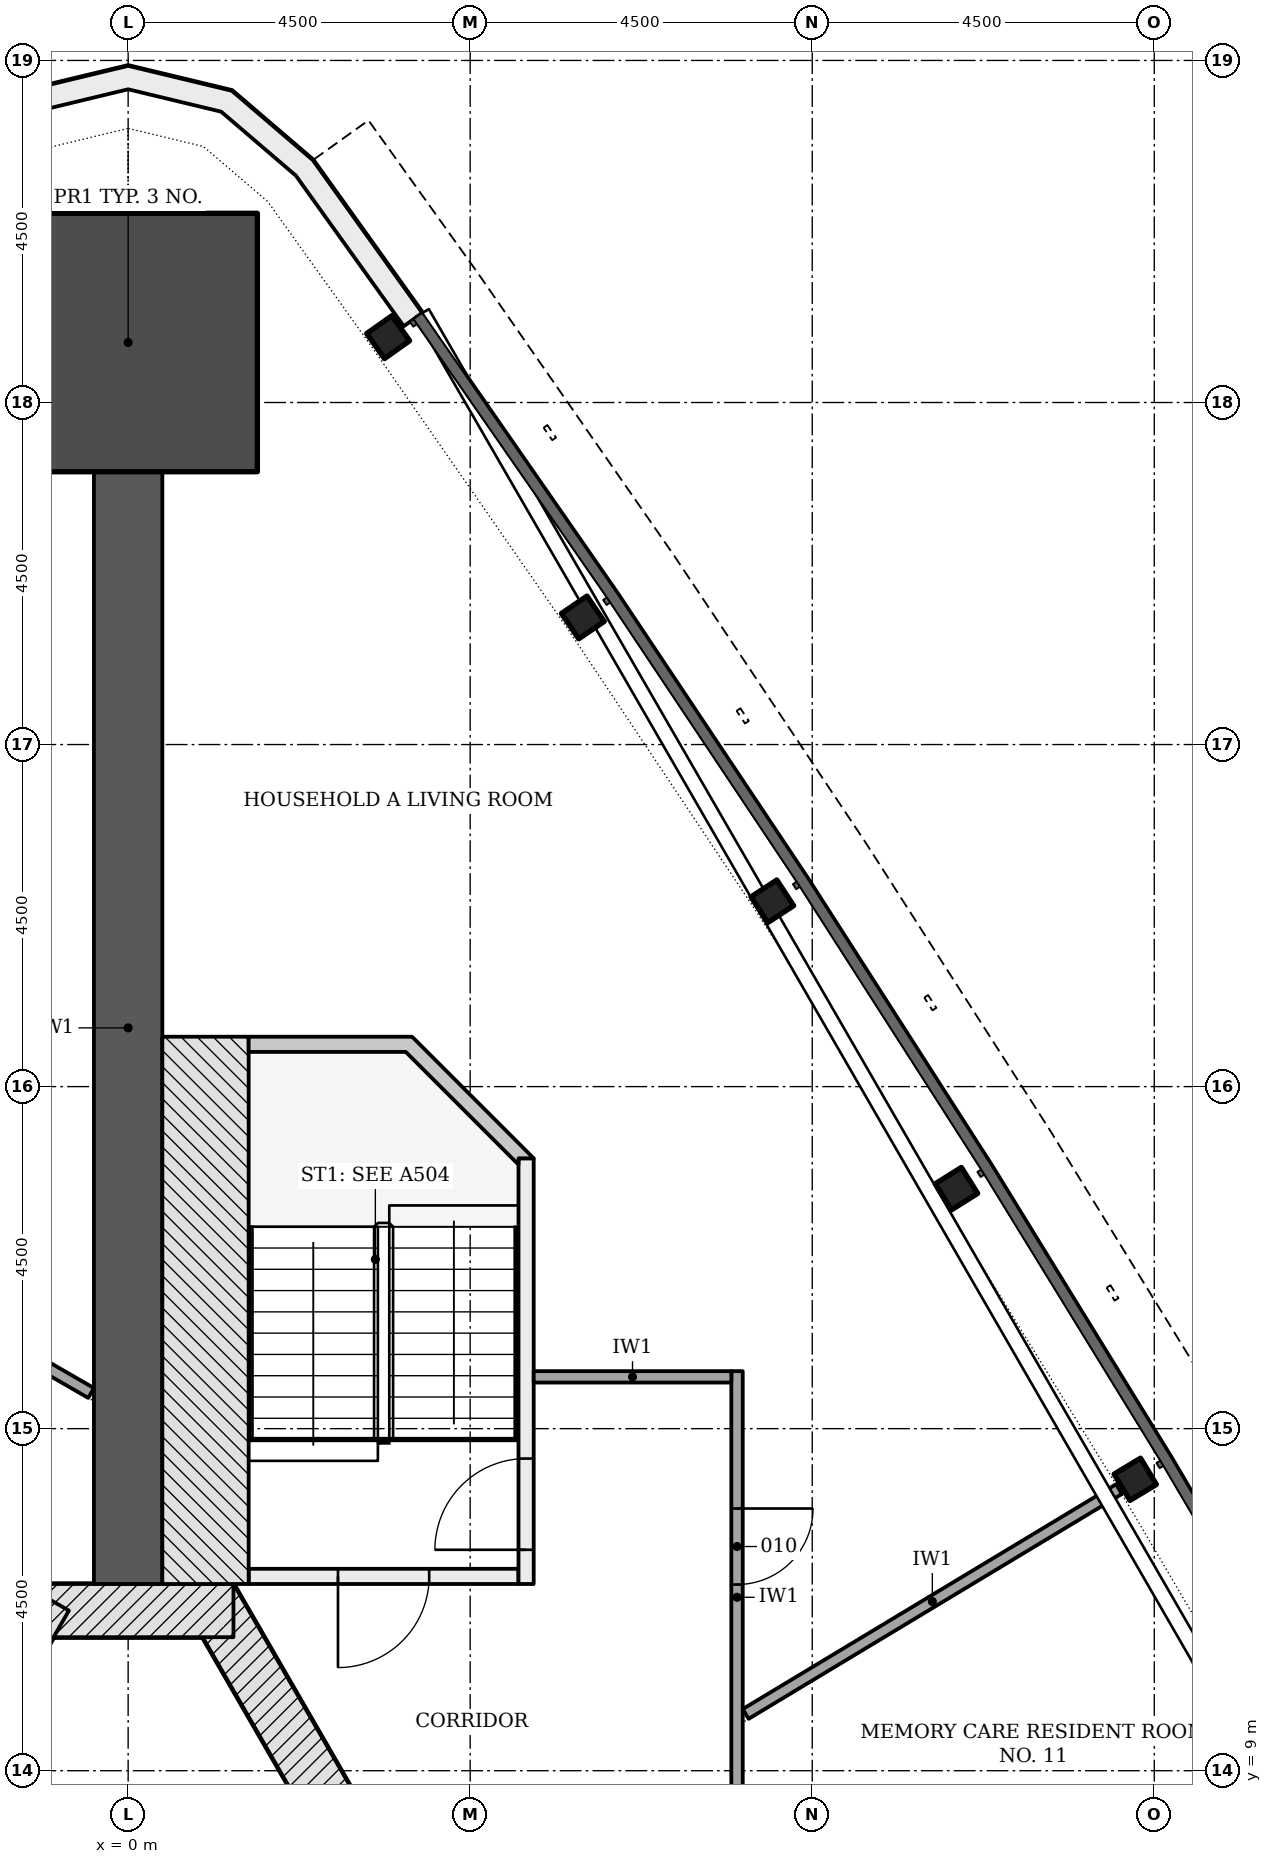
"""IFC4 building model, lengths in metres.
Left out: names, types, materials, properties, quantities, classifications, styles, units other than length and angle.
Written with IfcOpenShell. Run it as: python <this file> out.ifc"""

import sys

from ifc_helpers import new_model, si_unit, direction, frame, frame_2d, origin, origin_2d, place, context, subcontext, project, spatial, polyline, rectangle, i_section, outline, extrude, element, fill, save


model = new_model("IFC4")
c1 = context("Model", 3, precision=1e-05, world=origin(), true_north=direction((0.0, 1.0)))
c2 = subcontext(c1, "Body", "Model", "MODEL_VIEW")
j1 = project(units=[si_unit("LENGTHUNIT", "METRE"), si_unit("PLANEANGLEUNIT", "RADIAN")], contexts=[c1])
p1 = place(None, origin())
s1 = spatial("IfcSite", under=j1, at=p1, CompositionType="ELEMENT")
p2 = place(p1, origin())
s2 = spatial("IfcBuilding", under=s1, at=p2, CompositionType="ELEMENT")
p3 = place(p2, frame((0.0, 0.0, 27.6)))
s3 = spatial("IfcBuildingStorey", under=s2, at=p3, CompositionType="ELEMENT", Elevation=27.6)
p4 = place(p3, frame((10.311, -4.703, -0.2), z_axis=(0.0, 0.0, 1.0), x_axis=(-0.500001446645, 0.866024568562, 0.0)))
e1 = element("IfcWall", 1, at=p4, inside=s3, PredefinedType="SHEAR", context=c2, shape_type="SweptSolid", body=[
    extrude(rectangle(XDim=18.458, YDim=0.7, at=frame_2d((9.229, 0.0))), origin(), (0.0, 0.0, 1.0), 3.6),
])
p5 = place(p4, frame((8.7, 0.0, 0.2)))
e2 = element("IfcOpeningElement", 2, at=p5, cuts=e1, PredefinedType="OPENING", context=c2, shape_type="SweptSolid", body=[
    extrude(rectangle(XDim=1.0, YDim=2.1, at=frame_2d((0.5, 1.05))), frame((0.0, 0.36, 0.0), z_axis=(0.0, -1.0, 0.0), x_axis=(1.0, 0.0, 0.0)), (0.0, 0.0, 1.0), 0.72),
])
p6 = place(p4, frame((3.99, 0.0, 0.2)))
e3 = element("IfcOpeningElement", 3, at=p6, cuts=e1, PredefinedType="OPENING", context=c2, shape_type="SweptSolid", body=[
    extrude(rectangle(XDim=0.9, YDim=2.1, at=frame_2d((0.45, 1.05))), frame((0.0, 0.36, 0.0), z_axis=(0.0, -1.0, 0.0), x_axis=(1.0, 0.0, 0.0)), (0.0, 0.0, 1.0), 0.72),
])
p7 = place(p4, frame((13.539, 0.0, 0.2)))
e4 = element("IfcOpeningElement", 4, at=p7, cuts=e1, PredefinedType="OPENING", context=c2, shape_type="SweptSolid", body=[
    extrude(rectangle(XDim=0.9, YDim=2.1, at=frame_2d((0.45, 1.05))), frame((0.0, 0.36, 0.0), z_axis=(0.0, -1.0, 0.0), x_axis=(1.0, 0.0, 0.0)), (0.0, 0.0, 1.0), 0.72),
])
p8 = place(p3, frame((1.386, 11.106, -0.2), z_axis=(0.0, 0.0, 1.0), x_axis=(-1.0, 0.0, 0.0)))
e5 = element("IfcWall", 5, at=p8, inside=s3, PredefinedType="SHEAR", context=c2, shape_type="SweptSolid", body=[
    extrude(rectangle(XDim=2.771, YDim=0.7, at=frame_2d((1.386, 0.0))), origin(), (0.0, 0.0, 1.0), 3.6),
])
p9 = place(p3, frame((-1.083, 11.281, -0.2), z_axis=(0.0, 0.0, 1.0), x_axis=(-0.500001446645, -0.866024568562, 0.0)))
e6 = element("IfcWall", 6, at=p9, inside=s3, PredefinedType="SHEAR", context=c2, shape_type="SweptSolid", body=[
    extrude(rectangle(XDim=18.458, YDim=0.7, at=frame_2d((9.229, 0.0))), origin(), (0.0, 0.0, 1.0), 3.6),
])
p10 = place(p9, frame((8.979, 0.0, 0.2)))
e7 = element("IfcOpeningElement", 7, at=p10, cuts=e6, PredefinedType="OPENING", context=c2, shape_type="SweptSolid", body=[
    extrude(rectangle(XDim=1.2, YDim=2.1, at=frame_2d((0.6, 1.05))), frame((0.0, 0.36, 0.0), z_axis=(0.0, -1.0, 0.0), x_axis=(1.0, 0.0, 0.0)), (0.0, 0.0, 1.0), 0.72),
])
p11 = place(p9, frame((11.029, 0.0, 0.2)))
e8 = element("IfcOpeningElement", 8, at=p11, cuts=e6, PredefinedType="OPENING", context=c2, shape_type="SweptSolid", body=[
    extrude(rectangle(XDim=1.2, YDim=2.1, at=frame_2d((0.6, 1.05))), frame((0.0, 0.36, 0.0), z_axis=(0.0, -1.0, 0.0), x_axis=(1.0, 0.0, 0.0)), (0.0, 0.0, 1.0), 0.72),
])
p12 = place(p3, frame((0.0, 11.456, -0.2), z_axis=(0.0, 0.0, 1.0), x_axis=(0.0, 1.0, 0.0)))
e9 = element("IfcWall", 9, at=p12, inside=s3, PredefinedType="SHEAR", context=c2, shape_type="SweptSolid", body=[
    extrude(rectangle(XDim=14.633, YDim=0.9, at=frame_2d((7.316, 0.0))), origin(), (0.0, 0.0, 1.0), 3.6),
])
p13 = place(p3, frame((0.0, 27.789, -0.2), z_axis=(0.0, 0.0, 1.0), x_axis=(0.0, 1.0, 0.0)))
e10 = element("IfcColumn", 10, at=p13, inside=s3, PredefinedType="COLUMN", context=c2, shape_type="SweptSolid", body=[
    extrude(rectangle(XDim=3.4, YDim=3.4, at=origin_2d()), origin(), (0.0, 0.0, 1.0), 3.6),
])
for number, where, z_axis, x_axis in (
    (11, (13.25, 12.834, -0.2), (0.0, 0.0, 1.0), (-0.516, 0.857, 0.0)),
    (12, (10.897, 16.658, -0.2), (0.0, 0.0, 1.0), (-0.532, 0.847, 0.0)),
    (13, (8.475, 20.438, -0.2), (0.0, 0.0, 1.0), (-0.547, 0.837, 0.0)),
    (14, (5.982, 24.172, -0.2), (0.0, 0.0, 1.0), (-0.563, 0.827, 0.0)),
    (15, (3.421, 27.86, -0.2), (0.0, 0.0, 1.0), (-0.578, 0.816, 0.0)),
):
    element("IfcColumn", number, at=place(p3, frame(where, z_axis=z_axis, x_axis=x_axis)), inside=s3, PredefinedType="COLUMN", context=c2, shape_type="SweptSolid", body=[
        extrude(i_section(OverallWidth=0.404, OverallDepth=0.406, WebThickness=0.027, FlangeThickness=0.044, FilletRadius=0.015, at=origin_2d()), origin(), (0.0, 0.0, 1.0), 3.6),
    ])
p14 = place(p3, origin())
e16 = element("IfcWall", 16, at=p14, inside=s3, PredefinedType="NOTDEFINED", context=c2, shape_type="SweptSolid", body=[
    extrude(outline(polyline([(3.87, 28.178), (2.43, 30.188), (1.364, 31.101), (0.0, 31.429), (-1.364, 31.101), (-2.43, 30.188), (-3.87, 28.178), (-3.626, 28.003), (-2.208, 29.984), (-1.224, 30.826), (0.0, 31.121), (1.224, 30.826), (2.208, 29.984), (3.626, 28.003), (3.87, 28.178)])), origin(), (0.0, 0.0, 1.0), 3.3),
])
p15 = place(p3, frame((5.135, 11.556, -0.2), z_axis=(0.0, 0.0, 1.0), x_axis=(-1.0, 0.0, 0.0)))
e17 = element("IfcWall", 17, at=p15, inside=s3, PredefinedType="SHEAR", context=c2, shape_type="SweptSolid", body=[
    extrude(rectangle(XDim=3.55, YDim=0.2, at=frame_2d((1.775, 0.0))), origin(), (0.0, 0.0, 1.0), 3.6),
])
p16 = place(p15, frame((1.175, 0.0, 0.2)))
e18 = element("IfcOpeningElement", 18, at=p16, cuts=e17, PredefinedType="OPENING", context=c2, shape_type="SweptSolid", body=[
    extrude(rectangle(XDim=1.2, YDim=2.1, at=frame_2d((0.6, 1.05))), frame((0.0, 0.11, 0.0), z_axis=(0.0, -1.0, 0.0), x_axis=(1.0, 0.0, 0.0)), (0.0, 0.0, 1.0), 0.22),
])
p17 = place(p3, frame((5.236, 11.456, -0.2), z_axis=(0.0, 0.0, 1.0), x_axis=(0.0, 1.0, 0.0)))
e19 = element("IfcWall", 19, at=p17, inside=s3, PredefinedType="SHEAR", context=c2, shape_type="SweptSolid", body=[
    extrude(rectangle(XDim=5.6, YDim=0.2, at=frame_2d((2.8, 0.0))), origin(), (0.0, 0.0, 1.0), 3.6),
])
p18 = place(p17, frame((0.45, 0.0, 0.2)))
e20 = element("IfcOpeningElement", 20, at=p18, cuts=e19, PredefinedType="OPENING", context=c2, shape_type="SweptSolid", body=[
    extrude(rectangle(XDim=1.2, YDim=2.1, at=frame_2d((0.6, 1.05))), frame((0.0, 0.11, 0.0), z_axis=(0.0, -1.0, 0.0), x_axis=(1.0, 0.0, 0.0)), (0.0, 0.0, 1.0), 0.22),
])
p19 = place(p3, frame((1.018, 11.456, -0.2), z_axis=(0.0, 0.0, 1.0), x_axis=(0.0, 1.0, 0.0)))
e21 = element("IfcWall", 21, at=p19, inside=s3, PredefinedType="SHEAR", context=c2, shape_type="SweptSolid", body=[
    extrude(rectangle(XDim=7.2, YDim=1.136, at=frame_2d((3.6, 0.0))), origin(), (0.0, 0.0, 1.0), 3.6),
])
p20 = place(p3, frame((0.0, 0.0, -0.2)))
e22 = element("IfcWall", 22, at=p20, inside=s3, PredefinedType="SHEAR", context=c2, shape_type="SweptSolid", body=[
    extrude(outline(polyline([(5.336, 17.056), (3.736, 18.656), (1.586, 18.656), (1.586, 18.456), (3.653, 18.456), (5.135, 16.974), (5.135, 17.056), (5.135, 17.056), (5.135, 17.056), (5.135, 17.056), (5.135, 17.056), (5.135, 17.056), (5.135, 17.056), (5.135, 17.056), (5.135, 17.056), (5.135, 17.056), (5.135, 17.056), (5.135, 17.056), (5.135, 17.056), (5.135, 17.056), (5.135, 17.056), (5.135, 17.056), (5.135, 17.056), (5.336, 17.056)])), origin(), (0.0, 0.0, 1.0), 3.6),
])
p21 = place(p3, frame((8.01, 14.256, 0.0), z_axis=(0.0, 0.0, 1.0), x_axis=(0.0, -1.0, 0.0)))
e23 = element("IfcWall", 23, at=p21, inside=s3, PredefinedType="PARTITIONING", context=c2, shape_type="SweptSolid", body=[
    extrude(rectangle(XDim=5.95, YDim=0.15, at=frame_2d((2.975, 0.0))), origin(), (0.0, 0.0, 1.0), 2.768),
])
p22 = place(p21, frame((1.807, 0.0, 0.0)))
e24 = element("IfcOpeningElement", 24, at=p22, cuts=e23, PredefinedType="OPENING", context=c2, shape_type="SweptSolid", body=[
    extrude(rectangle(XDim=1.0, YDim=2.1, at=frame_2d((0.5, 1.05))), frame((0.0, 0.085, 0.0), z_axis=(0.0, -1.0, 0.0), x_axis=(1.0, 0.0, 0.0)), (0.0, 0.0, 1.0), 0.17),
])
p23 = place(p3, frame((-5.312, 16.755, 0.0), z_axis=(0.0, 0.0, 1.0), x_axis=(0.866028693448, -0.499994302092, 0.0)))
e25 = element("IfcWall", 25, at=p23, inside=s3, PredefinedType="PARTITIONING", context=c2, shape_type="SweptSolid", body=[
    extrude(rectangle(XDim=5.571, YDim=0.15, at=frame_2d((2.786, 0.0))), origin(), (0.0, 0.0, 1.0), 3.4),
])
p24 = place(p23, frame((2.045, 0.0, 0.0)))
e26 = element("IfcOpeningElement", 26, at=p24, cuts=e25, PredefinedType="OPENING", context=c2, shape_type="SweptSolid", body=[
    extrude(rectangle(XDim=1.5, YDim=2.1, at=frame_2d((0.75, 1.05))), frame((0.0, 0.085, 0.0), z_axis=(0.0, -1.0, 0.0), x_axis=(1.0, 0.0, 0.0)), (0.0, 0.0, 1.0), 0.17),
])
p25 = place(p3, frame((5.336, 14.181, 0.0), z_axis=(0.0, 0.0, 1.0), x_axis=(1.0, 0.0, 0.0)))
e27 = element("IfcWall", 27, at=p25, inside=s3, PredefinedType="PARTITIONING", context=c2, shape_type="SweptSolid", body=[
    extrude(rectangle(XDim=2.6, YDim=0.15, at=frame_2d((1.3, 0.0))), origin(), (0.0, 0.0, 1.0), 2.923),
])
p26 = place(p3, frame((15.314, 8.842, 0.0), z_axis=(0.0, 0.0, 1.0), x_axis=(-0.866015124653, -0.500017803555, 0.0)))
e28 = element("IfcWall", 28, at=p26, inside=s3, PredefinedType="PARTITIONING", context=c2, shape_type="SweptSolid", body=[
    extrude(rectangle(XDim=8.205, YDim=0.15, at=frame_2d((4.103, 0.0))), origin(), (0.0, 0.0, 1.0), 2.768),
])
p27 = place(p3, frame((13.036, 12.705, 0.0), z_axis=(0.0, 0.0, 1.0), x_axis=(-0.856612490534, -0.515960309579, 0.0)))
e29 = element("IfcWall", 29, at=p27, inside=s3, PredefinedType="PARTITIONING", context=c2, shape_type="SweptSolid", body=[
    extrude(rectangle(XDim=5.733, YDim=0.15, at=frame_2d((2.867, 0.0))), origin(), (0.0, 0.0, 1.0), 2.768),
])
p28 = place(p16, origin())
e30 = element("IfcDoor", 30, at=p28, inside=s3, OperationType="SINGLE_SWING_RIGHT", PredefinedType="DOOR", context=c2, shape_type="SweptSolid", body=[
    extrude(rectangle(XDim=1.2, YDim=2.1, at=frame_2d((0.6, 1.05))), frame((0.0, 0.025, 0.0), z_axis=(0.0, -1.0, 0.0), x_axis=(1.0, 0.0, 0.0)), (0.0, 0.0, 1.0), 0.05),
])
fill(e18, e30)
p29 = place(p18, origin())
e31 = element("IfcDoor", 31, at=p29, inside=s3, OperationType="SINGLE_SWING_LEFT", PredefinedType="DOOR", context=c2, shape_type="SweptSolid", body=[
    extrude(rectangle(XDim=1.2, YDim=2.1, at=frame_2d((0.6, 1.05))), frame((0.0, 0.025, 0.0), z_axis=(0.0, -1.0, 0.0), x_axis=(1.0, 0.0, 0.0)), (0.0, 0.0, 1.0), 0.05),
])
fill(e20, e31)
p30 = place(p22, origin())
e32 = element("IfcDoor", 32, at=p30, inside=s3, OperationType="SINGLE_SWING_LEFT", PredefinedType="DOOR", context=c2, shape_type="SweptSolid", body=[
    extrude(rectangle(XDim=1.0, YDim=2.1, at=frame_2d((0.5, 1.05))), frame((0.0, 0.025, 0.0), z_axis=(0.0, -1.0, 0.0), x_axis=(1.0, 0.0, 0.0)), (0.0, 0.0, 1.0), 0.05),
])
fill(e24, e32)
save(model, sys.argv[1])
